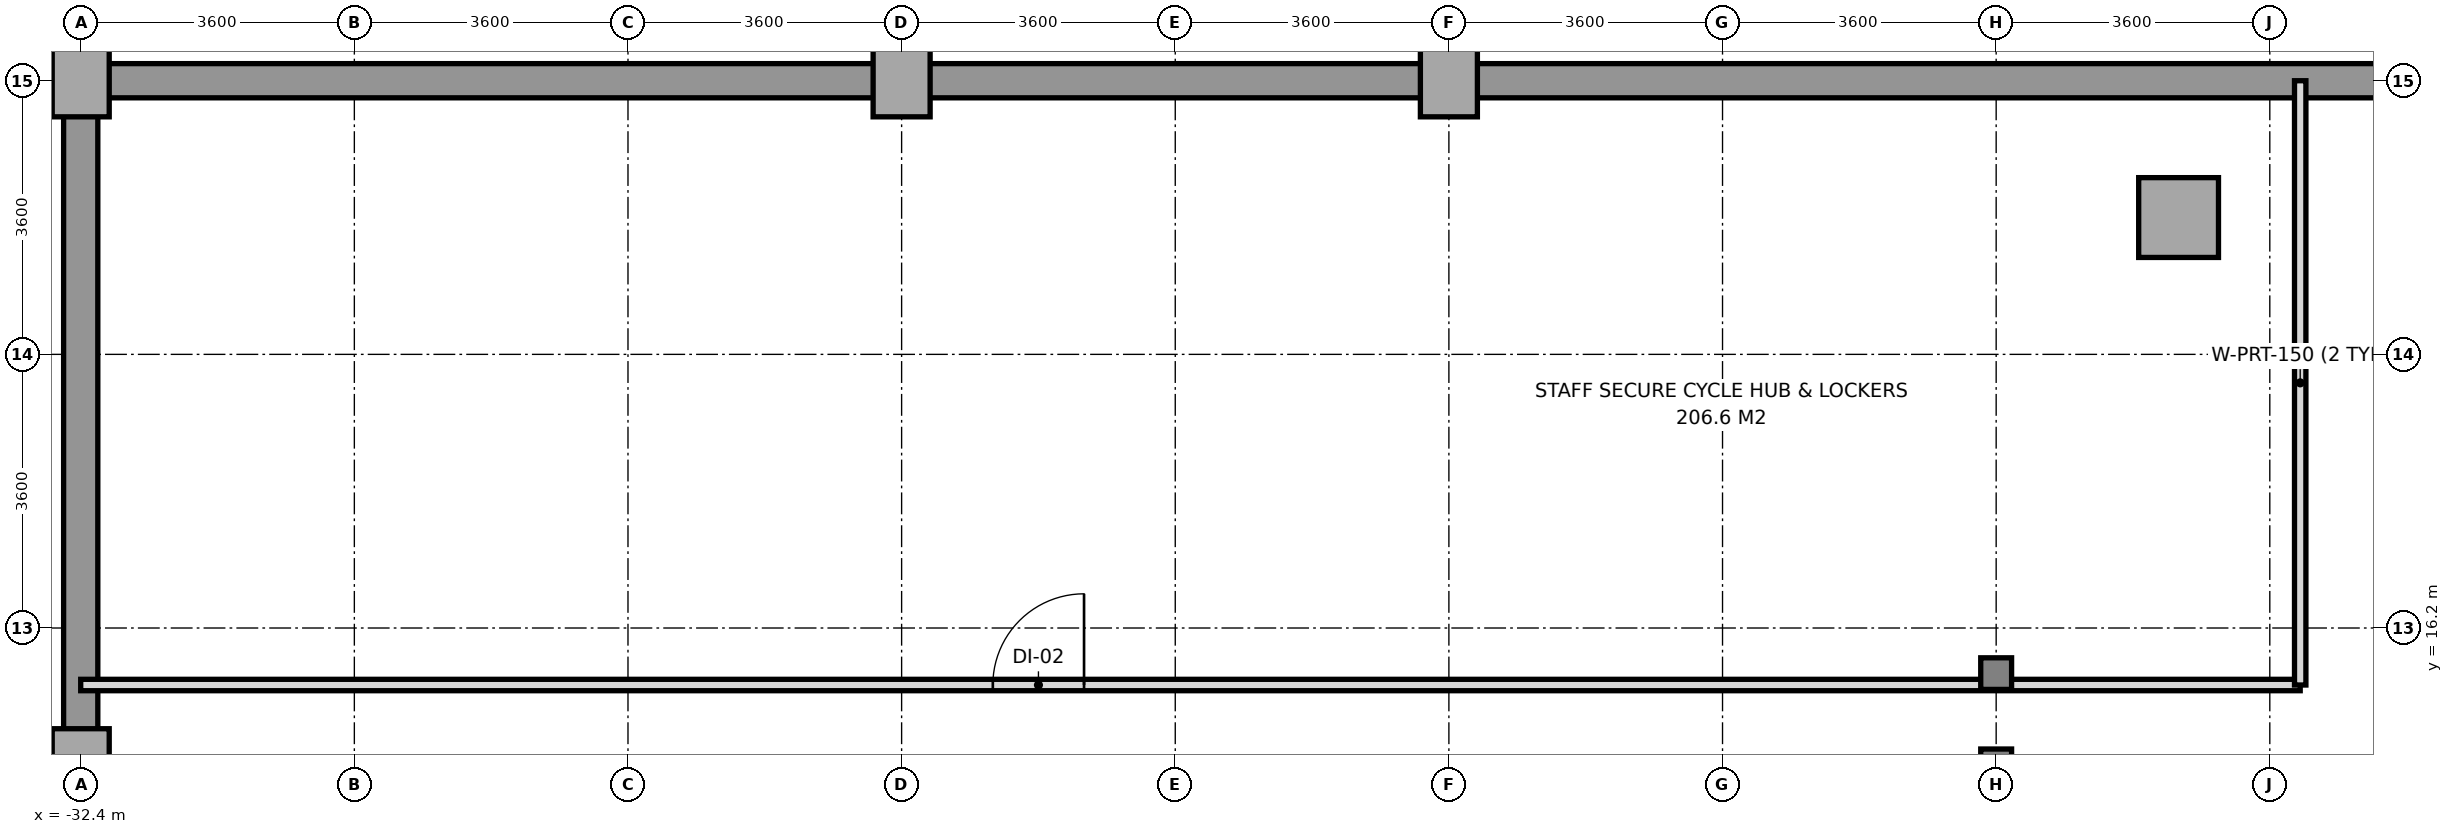
"""IFC4 building model, lengths in metres.
Left out: names, types, materials, properties, quantities, classifications, styles, units other than length and angle.
Written with IfcOpenShell. Run it as: python <this file> out.ifc"""

import sys

from ifc_helpers import new_model, si_unit, direction, frame, frame_2d, origin, origin_2d, place, context, subcontext, project, spatial, rectangle, i_section, extrude, source, transform, mapped, element, fill, save


model = new_model("IFC4")
c1 = context("Model", 3, precision=1e-05, world=origin(), true_north=direction((0.0, 1.0)))
c2 = subcontext(c1, "Body", "Model", "MODEL_VIEW")
j1 = project(units=[si_unit("LENGTHUNIT", "METRE"), si_unit("PLANEANGLEUNIT", "RADIAN")], contexts=[c1])
p1 = place(None, origin())
s1 = spatial("IfcSite", under=j1, at=p1, CompositionType="ELEMENT")
p2 = place(p1, origin())
s2 = spatial("IfcBuilding", under=s1, at=p2, CompositionType="ELEMENT")
p3 = place(p2, frame((0.0, 0.0, -4.2)))
s3 = spatial("IfcBuildingStorey", under=s2, at=p3, CompositionType="ELEMENT", Elevation=-4.2)
m1 = source(origin(), c2, "Body", "SweptSolid", [
    extrude(rectangle(XDim=0.75, YDim=0.95, at=origin_2d()), origin(), (0.0, 0.0, 1.0), 3.95),
])
for number, where, z_axis, x_axis in (
    (1, (-32.4, 14.4, 0.0), (0.0, 0.0, 1.0), (1.0, 0.0, 0.0)),
    (2, (-32.4, 23.4, 0.0), (0.0, 0.0, 1.0), (1.0, 0.0, 0.0)),
    (3, (-21.6, 23.4, 0.0), (0.0, 0.0, 1.0), (1.0, 0.0, 0.0)),
    (4, (-14.4, 23.4, 0.0), (0.0, 0.0, 1.0), (1.0, 0.0, 0.0)),
):
    element("IfcColumn", number, at=place(p3, frame(where, z_axis=z_axis, x_axis=x_axis)), inside=s3, PredefinedType="COLUMN", context=c2, shape_type="MappedRepresentation", body=[
        mapped(m1, transform((0.0, 0.0, 0.0), x_axis=(1.0, 0.0, 0.0), y_axis=(0.0, 1.0, 0.0), z_axis=(0.0, 0.0, 1.0), scale=1.0)),
    ])
m2 = source(origin(), c2, "Body", "SweptSolid", [
    extrude(i_section(OverallWidth=0.406, OverallDepth=0.416, WebThickness=0.024, FlangeThickness=0.039, at=origin_2d()), origin(), (0.0, 0.0, 1.0), 3.95),
])
for number, where, z_axis, x_axis in (
    (5, (-7.2, 14.4, 0.0), (0.0, 0.0, 1.0), (1.0, 0.0, 0.0)),
    (6, (-7.2, 15.6, 0.0), (0.0, 0.0, 1.0), (1.0, 0.0, 0.0)),
):
    element("IfcColumn", number, at=place(p3, frame(where, z_axis=z_axis, x_axis=x_axis)), inside=s3, PredefinedType="COLUMN", context=c2, shape_type="MappedRepresentation", body=[
        mapped(m2, transform((0.0, 0.0, 0.0), x_axis=(1.0, 0.0, 0.0), y_axis=(0.0, 1.0, 0.0), z_axis=(0.0, 0.0, 1.0), scale=1.0)),
    ])
m3 = source(origin(), c2, "Body", "SweptSolid", [
    extrude(rectangle(XDim=1.05, YDim=1.05, at=origin_2d()), origin(), (0.0, 0.0, 1.0), 3.95),
])
p4 = place(p3, frame((-4.8, 21.6, 0.0), z_axis=(0.0, 0.0, 1.0), x_axis=(1.0, 0.0, 0.0)))
e7 = element("IfcColumn", 7, at=p4, inside=s3, PredefinedType="COLUMN", context=c2, shape_type="MappedRepresentation", body=[
    mapped(m3, transform((0.0, 0.0, 0.0), x_axis=(1.0, 0.0, 0.0), y_axis=(0.0, 1.0, 0.0), z_axis=(0.0, 0.0, 1.0), scale=1.0)),
])
p5 = place(p3, frame((32.4, 23.4, 0.0), z_axis=(0.0, 0.0, 1.0), x_axis=(-1.0, 0.0, 0.0)))
e8 = element("IfcWall", 8, at=p5, inside=s3, PredefinedType="USERDEFINED", context=c2, shape_type="SweptSolid", body=[
    extrude(rectangle(XDim=64.8, YDim=0.45, at=frame_2d((32.4, 0.0))), origin(), (0.0, 0.0, 1.0), 3.95),
])
p6 = place(p3, frame((-32.4, 23.4, 0.0), z_axis=(0.0, 0.0, 1.0), x_axis=(0.0, -1.0, 0.0)))
e9 = element("IfcWall", 9, at=p6, inside=s3, PredefinedType="USERDEFINED", context=c2, shape_type="SweptSolid", body=[
    extrude(rectangle(XDim=43.2, YDim=0.45, at=frame_2d((21.6, 0.0))), origin(), (0.0, 0.0, 1.0), 3.95),
])
p7 = place(p3, frame((-32.4, 15.45, 0.0), z_axis=(0.0, 0.0, 1.0), x_axis=(1.0, 0.0, 0.0)))
e10 = element("IfcWall", 10, at=p7, inside=s3, PredefinedType="PARTITIONING", context=c2, shape_type="SweptSolid", body=[
    extrude(rectangle(XDim=29.2, YDim=0.15, at=frame_2d((14.6, 0.0))), origin(), (0.0, 0.0, 1.0), 3.3),
])
p8 = place(p7, frame((12.0, 0.0, 0.0)))
e11 = element("IfcOpeningElement", 11, at=p8, cuts=e10, PredefinedType="OPENING", context=c2, shape_type="SweptSolid", body=[
    extrude(rectangle(XDim=1.2, YDim=2.2, at=frame_2d((0.6, 1.1))), frame((0.0, 0.085, 0.0), z_axis=(0.0, -1.0, 0.0), x_axis=(1.0, 0.0, 0.0)), (0.0, 0.0, 1.0), 0.17),
])
p9 = place(p3, frame((-3.2, 15.45, 0.0), z_axis=(0.0, 0.0, 1.0), x_axis=(0.0, 1.0, 0.0)))
e12 = element("IfcWall", 12, at=p9, inside=s3, PredefinedType="PARTITIONING", context=c2, shape_type="SweptSolid", body=[
    extrude(rectangle(XDim=7.95, YDim=0.15, at=frame_2d((3.975, 0.0))), origin(), (0.0, 0.0, 1.0), 3.3),
])
m4 = source(origin(), c2, "Body", "SweptSolid", [
    extrude(rectangle(XDim=1.2, YDim=2.2, at=frame_2d((0.6, 1.1))), frame((0.0, 0.025, 0.0), z_axis=(0.0, -1.0, 0.0), x_axis=(1.0, 0.0, 0.0)), (0.0, 0.0, 1.0), 0.05),
])
p10 = place(p8, origin())
e13 = element("IfcDoor", 13, at=p10, inside=s3, OperationType="SINGLE_SWING_RIGHT", PredefinedType="DOOR", context=c2, shape_type="MappedRepresentation", body=[
    mapped(m4, transform((0.0, 0.0, 0.0), x_axis=(1.0, 0.0, 0.0), y_axis=(0.0, 1.0, 0.0), z_axis=(0.0, 0.0, 1.0), scale=1.0)),
])
fill(e11, e13)
save(model, sys.argv[1])
